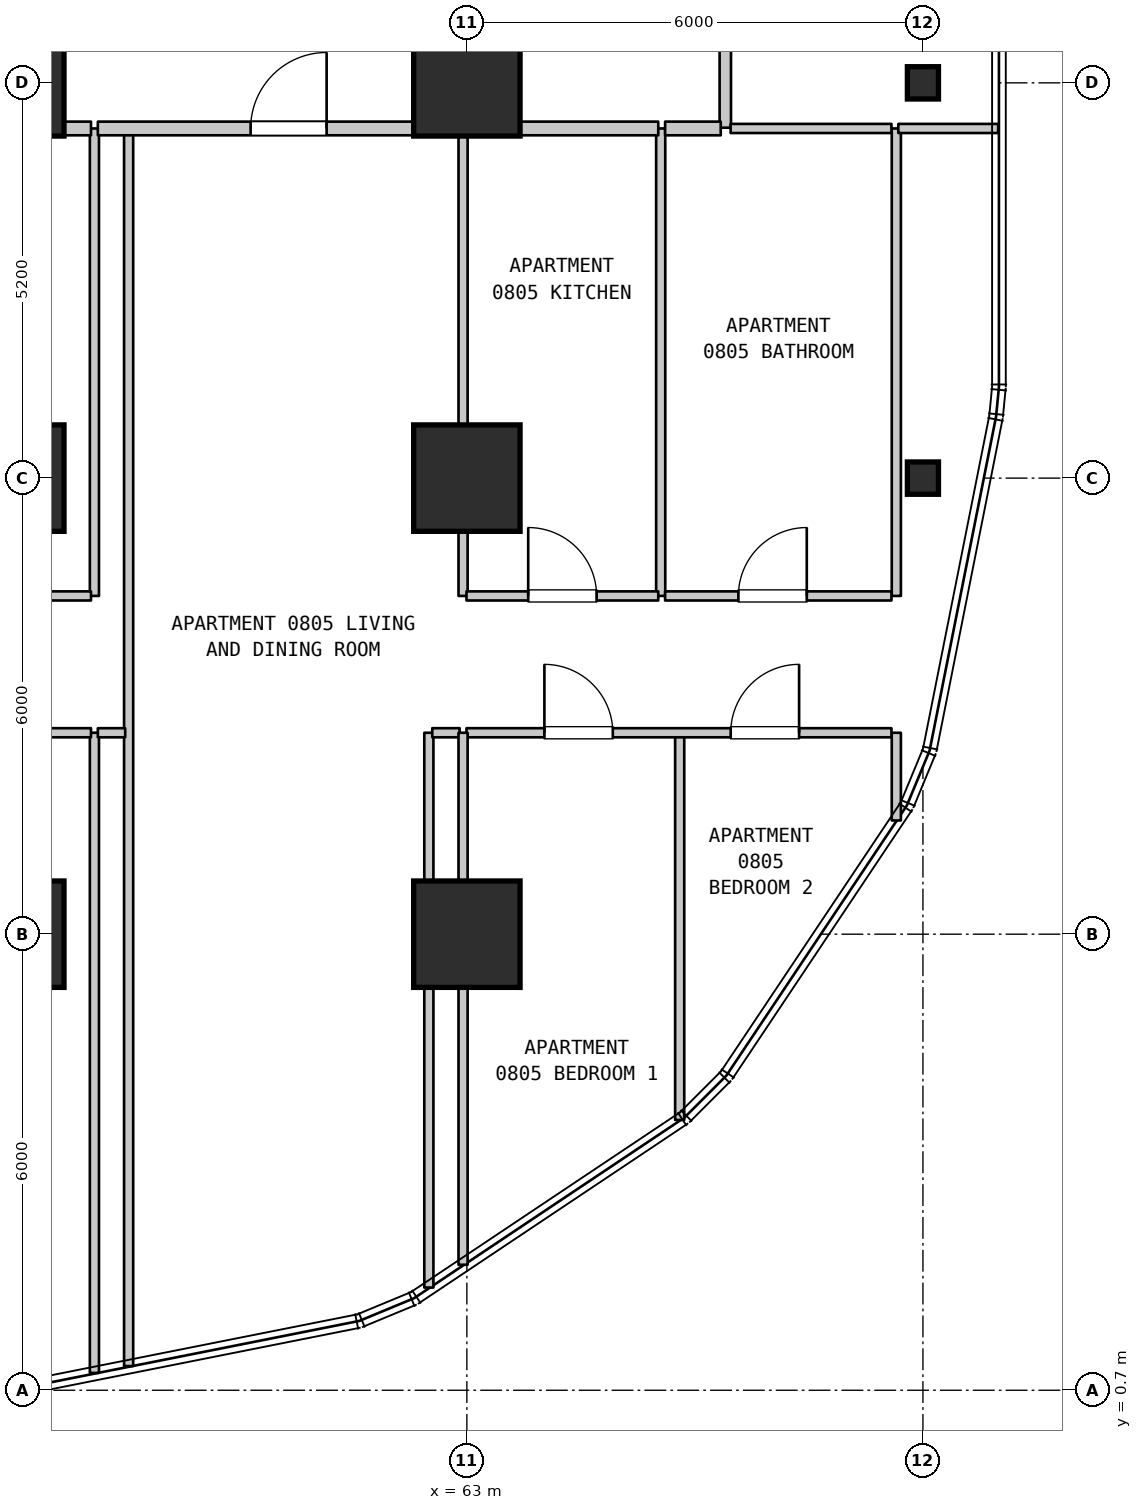
"""IFC4 building model, lengths in metres.
Left out: names, types, materials, properties, quantities, classifications, styles, units other than length and angle.
Written with IfcOpenShell. Run it as: python <this file> out.ifc"""

import sys

from ifc_helpers import new_model, si_unit, direction, frame, frame_2d, origin, origin_2d, place, context, subcontext, project, spatial, rectangle, i_section, extrude, element, fill, save


model = new_model("IFC4")
c1 = context("Model", 3, precision=1e-05, world=origin(), true_north=direction((0.0, 1.0)))
c2 = subcontext(c1, "Body", "Model", "MODEL_VIEW")
j1 = project(units=[si_unit("LENGTHUNIT", "METRE"), si_unit("PLANEANGLEUNIT", "RADIAN")], contexts=[c1])
p1 = place(None, origin())
s1 = spatial("IfcSite", under=j1, at=p1, CompositionType="ELEMENT")
p2 = place(p1, origin())
s2 = spatial("IfcBuilding", under=s1, at=p2, CompositionType="ELEMENT")
p3 = place(p2, frame((0.0, 0.0, 38.8)))
s3 = spatial("IfcBuildingStorey", under=s2, at=p3, CompositionType="ELEMENT", Elevation=38.8)
for number, where, z_axis, x_axis in (
    (1, (57.0, 6.7, 0.0), (0.0, 0.0, 1.0), (1.0, 0.0, 0.0)),
    (2, (57.0, 12.7, 0.0), (0.0, 0.0, 1.0), (1.0, 0.0, 0.0)),
    (3, (57.0, 17.9, 0.0), (0.0, 0.0, 1.0), (1.0, 0.0, 0.0)),
    (4, (63.0, 6.7, 0.0), (0.0, 0.0, 1.0), (1.0, 0.0, 0.0)),
    (5, (63.0, 12.7, 0.0), (0.0, 0.0, 1.0), (1.0, 0.0, 0.0)),
    (6, (63.0, 17.9, 0.0), (0.0, 0.0, 1.0), (1.0, 0.0, 0.0)),
):
    element("IfcColumn", number, at=place(p3, frame(where, z_axis=z_axis, x_axis=x_axis)), inside=s3, PredefinedType="COLUMN", context=c2, shape_type="SweptSolid", body=[
        extrude(rectangle(XDim=1.4, YDim=1.4, at=origin_2d()), origin(), (0.0, 0.0, 1.0), 3.7),
    ])
for number, where, z_axis, x_axis in (
    (7, (69.0, 12.7, 0.0), (0.0, 0.0, 1.0), (1.0, 0.0, 0.0)),
    (8, (69.0, 17.9, 0.0), (0.0, 0.0, 1.0), (1.0, 0.0, 0.0)),
):
    element("IfcColumn", number, at=place(p3, frame(where, z_axis=z_axis, x_axis=x_axis)), inside=s3, PredefinedType="COLUMN", context=c2, shape_type="SweptSolid", body=[
        extrude(i_section(OverallWidth=0.409, OverallDepth=0.425, WebThickness=0.032, FlangeThickness=0.052, FilletRadius=0.015, at=origin_2d()), origin(), (0.0, 0.0, 1.0), 3.7),
    ])
p4 = place(p3, frame((58.1, 0.928, 0.0), z_axis=(0.0, 0.0, 1.0), x_axis=(0.0, 1.0, 0.0)))
e9 = element("IfcWall", 9, at=p4, inside=s3, PredefinedType="PARTITIONING", context=c2, shape_type="SweptSolid", body=[
    extrude(rectangle(XDim=8.422, YDim=0.12, at=frame_2d((4.211, 0.0))), origin(), (0.0, 0.0, 1.0), 3.385),
])
p5 = place(p3, frame((58.1, 11.15, 0.0), z_axis=(0.0, 0.0, 1.0), x_axis=(0.0, 1.0, 0.0)))
e10 = element("IfcWall", 10, at=p5, inside=s3, PredefinedType="PARTITIONING", context=c2, shape_type="SweptSolid", body=[
    extrude(rectangle(XDim=6.15, YDim=0.12, at=frame_2d((3.075, 0.0))), origin(), (0.0, 0.0, 1.0), 3.385),
])
p6 = place(p3, frame((58.55, 1.018, 0.0), z_axis=(0.0, 0.0, 1.0), x_axis=(0.0, 1.0, 0.0)))
e11 = element("IfcWall", 11, at=p6, inside=s3, PredefinedType="PARTITIONING", context=c2, shape_type="SweptSolid", body=[
    extrude(rectangle(XDim=16.282, YDim=0.12, at=frame_2d((8.141, 0.0))), origin(), (0.0, 0.0, 1.0), 3.385),
])
p7 = place(p3, frame((62.5, 2.051, 0.0), z_axis=(0.0, 0.0, 1.0), x_axis=(0.0, 1.0, 0.0)))
e12 = element("IfcWall", 12, at=p7, inside=s3, PredefinedType="PARTITIONING", context=c2, shape_type="SweptSolid", body=[
    extrude(rectangle(XDim=7.299, YDim=0.12, at=frame_2d((3.649, 0.0))), origin(), (0.0, 0.0, 1.0), 3.385),
])
p8 = place(p3, frame((62.95, 2.351, 0.0), z_axis=(0.0, 0.0, 1.0), x_axis=(0.0, 1.0, 0.0)))
e13 = element("IfcWall", 13, at=p8, inside=s3, PredefinedType="PARTITIONING", context=c2, shape_type="SweptSolid", body=[
    extrude(rectangle(XDim=4.349, YDim=0.12, at=frame_2d((2.174, 0.0))), origin(), (0.0, 0.0, 1.0), 3.385),
])
p9 = place(p3, frame((62.95, 11.15, 0.0), z_axis=(0.0, 0.0, 1.0), x_axis=(0.0, 1.0, 0.0)))
e14 = element("IfcWall", 14, at=p9, inside=s3, PredefinedType="PARTITIONING", context=c2, shape_type="SweptSolid", body=[
    extrude(rectangle(XDim=6.15, YDim=0.12, at=frame_2d((3.075, 0.0))), origin(), (0.0, 0.0, 1.0), 2.885),
])
p10 = place(p3, frame((65.55, 11.15, 0.0), z_axis=(0.0, 0.0, 1.0), x_axis=(0.0, 1.0, 0.0)))
e15 = element("IfcWall", 15, at=p10, inside=s3, PredefinedType="PARTITIONING", context=c2, shape_type="SweptSolid", body=[
    extrude(rectangle(XDim=6.15, YDim=0.12, at=frame_2d((3.075, 0.0))), origin(), (0.0, 0.0, 1.0), 3.385),
])
p11 = place(p3, frame((65.8, 4.256, 0.0), z_axis=(0.0, 0.0, 1.0), x_axis=(0.0, 1.0, 0.0)))
e16 = element("IfcWall", 16, at=p11, inside=s3, PredefinedType="PARTITIONING", context=c2, shape_type="SweptSolid", body=[
    extrude(rectangle(XDim=5.094, YDim=0.12, at=frame_2d((2.547, 0.0))), origin(), (0.0, 0.0, 1.0), 3.385),
])
p12 = place(p3, frame((66.4, 17.31, 0.0), z_axis=(0.0, 0.0, 1.0), x_axis=(0.0, 1.0, 0.0)))
e17 = element("IfcWall", 17, at=p12, inside=s3, PredefinedType="STANDARD", context=c2, shape_type="SweptSolid", body=[
    extrude(rectangle(XDim=2.34, YDim=0.15, at=frame_2d((1.17, 0.0))), origin(), (0.0, 0.0, 1.0), 3.385),
])
p13 = place(p3, frame((68.65, 8.196, 0.0), z_axis=(0.0, 0.0, 1.0), x_axis=(0.0, 1.0, 0.0)))
e18 = element("IfcWall", 18, at=p13, inside=s3, PredefinedType="PARTITIONING", context=c2, shape_type="SweptSolid", body=[
    extrude(rectangle(XDim=1.154, YDim=0.12, at=frame_2d((0.577, 0.0))), origin(), (0.0, 0.0, 1.0), 3.385),
])
p14 = place(p3, frame((68.65, 11.15, 0.0), z_axis=(0.0, 0.0, 1.0), x_axis=(0.0, 1.0, 0.0)))
e19 = element("IfcWall", 19, at=p14, inside=s3, PredefinedType="PARTITIONING", context=c2, shape_type="SweptSolid", body=[
    extrude(rectangle(XDim=6.15, YDim=0.12, at=frame_2d((3.075, 0.0))), origin(), (0.0, 0.0, 1.0), 3.385),
])
p15 = place(p3, frame((51.635, 9.35, 0.0), z_axis=(0.0, 0.0, 1.0), x_axis=(1.0, 0.0, 0.0)))
e20 = element("IfcWall", 20, at=p15, inside=s3, PredefinedType="PARTITIONING", context=c2, shape_type="SweptSolid", body=[
    extrude(rectangle(XDim=6.42, YDim=0.12, at=frame_2d((3.21, 0.0))), origin(), (0.0, 0.0, 1.0), 3.385),
])
p16 = place(p15, frame((1.307, 0.0, 0.0)))
e21 = element("IfcOpeningElement", 21, at=p16, cuts=e20, PredefinedType="OPENING", context=c2, shape_type="SweptSolid", body=[
    extrude(rectangle(XDim=0.9, YDim=2.15, at=frame_2d((0.45, 1.075))), frame((0.0, 0.07, 0.0), z_axis=(0.0, -1.0, 0.0), x_axis=(1.0, 0.0, 0.0)), (0.0, 0.0, 1.0), 0.14),
])
p17 = place(p15, frame((4.212, 0.0, 0.0)))
e22 = element("IfcOpeningElement", 22, at=p17, cuts=e20, PredefinedType="OPENING", context=c2, shape_type="SweptSolid", body=[
    extrude(rectangle(XDim=0.9, YDim=2.15, at=frame_2d((0.45, 1.075))), frame((0.0, 0.07, 0.0), z_axis=(0.0, -1.0, 0.0), x_axis=(1.0, 0.0, 0.0)), (0.0, 0.0, 1.0), 0.14),
])
p18 = place(p3, frame((58.145, 9.35, 0.0), z_axis=(0.0, 0.0, 1.0), x_axis=(1.0, 0.0, 0.0)))
e23 = element("IfcWall", 23, at=p18, inside=s3, PredefinedType="PARTITIONING", context=c2, shape_type="SweptSolid", body=[
    extrude(rectangle(XDim=0.36, YDim=0.12, at=frame_2d((0.18, 0.0))), origin(), (0.0, 0.0, 1.0), 3.385),
])
p19 = place(p3, frame((62.545, 9.35, 0.0), z_axis=(0.0, 0.0, 1.0), x_axis=(1.0, 0.0, 0.0)))
e24 = element("IfcWall", 24, at=p19, inside=s3, PredefinedType="PARTITIONING", context=c2, shape_type="SweptSolid", body=[
    extrude(rectangle(XDim=0.36, YDim=0.12, at=frame_2d((0.18, 0.0))), origin(), (0.0, 0.0, 1.0), 3.385),
])
p20 = place(p3, frame((62.995, 9.35, 0.0), z_axis=(0.0, 0.0, 1.0), x_axis=(1.0, 0.0, 0.0)))
e25 = element("IfcWall", 25, at=p20, inside=s3, PredefinedType="PARTITIONING", context=c2, shape_type="SweptSolid", body=[
    extrude(rectangle(XDim=5.591, YDim=0.12, at=frame_2d((2.795, 0.0))), origin(), (0.0, 0.0, 1.0), 3.385),
])
p21 = place(p20, frame((1.025, 0.0, 0.0)))
e26 = element("IfcOpeningElement", 26, at=p21, cuts=e25, PredefinedType="OPENING", context=c2, shape_type="SweptSolid", body=[
    extrude(rectangle(XDim=0.9, YDim=2.15, at=frame_2d((0.45, 1.075))), frame((0.0, 0.07, 0.0), z_axis=(0.0, -1.0, 0.0), x_axis=(1.0, 0.0, 0.0)), (0.0, 0.0, 1.0), 0.14),
])
p22 = place(p20, frame((3.476, 0.0, 0.0)))
e27 = element("IfcOpeningElement", 27, at=p22, cuts=e25, PredefinedType="OPENING", context=c2, shape_type="SweptSolid", body=[
    extrude(rectangle(XDim=0.9, YDim=2.15, at=frame_2d((0.45, 1.075))), frame((0.0, 0.07, 0.0), z_axis=(0.0, -1.0, 0.0), x_axis=(1.0, 0.0, 0.0)), (0.0, 0.0, 1.0), 0.14),
])
p23 = place(p3, frame((54.63, 11.15, 0.0), z_axis=(0.0, 0.0, 1.0), x_axis=(1.0, 0.0, 0.0)))
e28 = element("IfcWall", 28, at=p23, inside=s3, PredefinedType="PARTITIONING", context=c2, shape_type="SweptSolid", body=[
    extrude(rectangle(XDim=3.425, YDim=0.12, at=frame_2d((1.712, 0.0))), origin(), (0.0, 0.0, 1.0), 3.385),
])
p24 = place(p23, frame((0.769, 0.0, 0.0)))
e29 = element("IfcOpeningElement", 29, at=p24, cuts=e28, PredefinedType="OPENING", context=c2, shape_type="SweptSolid", body=[
    extrude(rectangle(XDim=0.9, YDim=2.1, at=frame_2d((0.45, 1.05))), frame((0.0, 0.07, 0.0), z_axis=(0.0, -1.0, 0.0), x_axis=(1.0, 0.0, 0.0)), (0.0, 0.0, 1.0), 0.14),
])
p25 = place(p3, frame((62.995, 11.15, 0.0), z_axis=(0.0, 0.0, 1.0), x_axis=(1.0, 0.0, 0.0)))
e30 = element("IfcWall", 30, at=p25, inside=s3, PredefinedType="PARTITIONING", context=c2, shape_type="SweptSolid", body=[
    extrude(rectangle(XDim=2.523, YDim=0.12, at=frame_2d((1.261, 0.0))), origin(), (0.0, 0.0, 1.0), 3.385),
])
p26 = place(p25, frame((0.812, 0.0, 0.0)))
e31 = element("IfcOpeningElement", 31, at=p26, cuts=e30, PredefinedType="OPENING", context=c2, shape_type="SweptSolid", body=[
    extrude(rectangle(XDim=0.9, YDim=2.15, at=frame_2d((0.45, 1.075))), frame((0.0, 0.07, 0.0), z_axis=(0.0, -1.0, 0.0), x_axis=(1.0, 0.0, 0.0)), (0.0, 0.0, 1.0), 0.14),
])
p27 = place(p3, frame((65.608, 11.15, 0.0), z_axis=(0.0, 0.0, 1.0), x_axis=(1.0, 0.0, 0.0)))
e32 = element("IfcWall", 32, at=p27, inside=s3, PredefinedType="PARTITIONING", context=c2, shape_type="SweptSolid", body=[
    extrude(rectangle(XDim=2.978, YDim=0.12, at=frame_2d((1.489, 0.0))), origin(), (0.0, 0.0, 1.0), 3.385),
])
p28 = place(p27, frame((0.964, 0.0, 0.0)))
e33 = element("IfcOpeningElement", 33, at=p28, cuts=e32, PredefinedType="OPENING", context=c2, shape_type="SweptSolid", body=[
    extrude(rectangle(XDim=0.9, YDim=2.1, at=frame_2d((0.45, 1.05))), frame((0.0, 0.07, 0.0), z_axis=(0.0, -1.0, 0.0), x_axis=(1.0, 0.0, 0.0)), (0.0, 0.0, 1.0), 0.14),
])
p29 = place(p3, frame((54.63, 17.3, 0.0), z_axis=(0.0, 0.0, 1.0), x_axis=(1.0, 0.0, 0.0)))
e34 = element("IfcWall", 34, at=p29, inside=s3, PredefinedType="STANDARD", context=c2, shape_type="SweptSolid", body=[
    extrude(rectangle(XDim=3.425, YDim=0.18, at=frame_2d((1.712, 0.0))), origin(), (0.0, 0.0, 1.0), 3.385),
])
p30 = place(p3, frame((58.145, 17.3, 0.0), z_axis=(0.0, 0.0, 1.0), x_axis=(1.0, 0.0, 0.0)))
e35 = element("IfcWall", 35, at=p30, inside=s3, PredefinedType="STANDARD", context=c2, shape_type="SweptSolid", body=[
    extrude(rectangle(XDim=4.76, YDim=0.18, at=frame_2d((2.38, 0.0))), origin(), (0.0, 0.0, 1.0), 3.385),
])
p31 = place(p30, frame((2.01, 0.0, 0.0)))
e36 = element("IfcOpeningElement", 36, at=p31, cuts=e35, PredefinedType="OPENING", context=c2, shape_type="SweptSolid", body=[
    extrude(rectangle(XDim=1.0, YDim=2.15, at=frame_2d((0.5, 1.075))), frame((0.0, 0.1, 0.0), z_axis=(0.0, -1.0, 0.0), x_axis=(1.0, 0.0, 0.0)), (0.0, 0.0, 1.0), 0.2),
])
p32 = place(p3, frame((62.995, 17.3, 0.0), z_axis=(0.0, 0.0, 1.0), x_axis=(1.0, 0.0, 0.0)))
e37 = element("IfcWall", 37, at=p32, inside=s3, PredefinedType="STANDARD", context=c2, shape_type="SweptSolid", body=[
    extrude(rectangle(XDim=2.523, YDim=0.18, at=frame_2d((1.261, 0.0))), origin(), (0.0, 0.0, 1.0), 3.385),
])
p33 = place(p3, frame((65.608, 17.3, 0.0), z_axis=(0.0, 0.0, 1.0), x_axis=(1.0, 0.0, 0.0)))
e38 = element("IfcWall", 38, at=p33, inside=s3, PredefinedType="STANDARD", context=c2, shape_type="SweptSolid", body=[
    extrude(rectangle(XDim=0.732, YDim=0.18, at=frame_2d((0.366, 0.0))), origin(), (0.0, 0.0, 1.0), 3.385),
])
p34 = place(p3, frame((66.47, 17.3, 0.0), z_axis=(0.0, 0.0, 1.0), x_axis=(1.0, 0.0, 0.0)))
e39 = element("IfcWall", 39, at=p34, inside=s3, PredefinedType="PARTITIONING", context=c2, shape_type="SweptSolid", body=[
    extrude(rectangle(XDim=2.116, YDim=0.12, at=frame_2d((1.058, 0.0))), origin(), (0.0, 0.0, 1.0), 3.385),
])
p35 = place(p3, frame((68.676, 17.3, 0.0), z_axis=(0.0, 0.0, 1.0), x_axis=(1.0, 0.0, 0.0)))
e40 = element("IfcWall", 40, at=p35, inside=s3, PredefinedType="PARTITIONING", context=c2, shape_type="SweptSolid", body=[
    extrude(rectangle(XDim=1.314, YDim=0.12, at=frame_2d((0.657, 0.0))), origin(), (0.0, 0.0, 1.0), 3.385),
])
p36 = place(p3, frame((62.95, 6.7, 0.0), z_axis=(0.0, 0.0, 1.0), x_axis=(0.0, 1.0, 0.0)))
e41 = element("IfcWall", 41, at=p36, inside=s3, PredefinedType="PARTITIONING", context=c2, shape_type="SweptSolid", body=[
    extrude(rectangle(XDim=2.65, YDim=0.12, at=frame_2d((1.325, 0.0))), origin(), (0.0, 0.0, 1.0), 2.885),
])
p37 = place(p21, origin())
e42 = element("IfcDoor", 42, at=p37, inside=s3, OperationType="SINGLE_SWING_LEFT", PredefinedType="DOOR", context=c2, shape_type="SweptSolid", body=[
    extrude(rectangle(XDim=0.9, YDim=2.15, at=frame_2d((0.45, 1.075))), frame((0.0, 0.025, 0.0), z_axis=(0.0, -1.0, 0.0), x_axis=(1.0, 0.0, 0.0)), (0.0, 0.0, 1.0), 0.05),
])
fill(e26, e42)
p38 = place(p22, origin())
e43 = element("IfcDoor", 43, at=p38, inside=s3, OperationType="SINGLE_SWING_RIGHT", PredefinedType="DOOR", context=c2, shape_type="SweptSolid", body=[
    extrude(rectangle(XDim=0.9, YDim=2.15, at=frame_2d((0.45, 1.075))), frame((0.0, 0.025, 0.0), z_axis=(0.0, -1.0, 0.0), x_axis=(1.0, 0.0, 0.0)), (0.0, 0.0, 1.0), 0.05),
])
fill(e27, e43)
p39 = place(p26, origin())
e44 = element("IfcDoor", 44, at=p39, inside=s3, OperationType="SINGLE_SWING_LEFT", PredefinedType="DOOR", context=c2, shape_type="SweptSolid", body=[
    extrude(rectangle(XDim=0.9, YDim=2.15, at=frame_2d((0.45, 1.075))), frame((0.0, 0.025, 0.0), z_axis=(0.0, -1.0, 0.0), x_axis=(1.0, 0.0, 0.0)), (0.0, 0.0, 1.0), 0.05),
])
fill(e31, e44)
p40 = place(p28, origin())
e45 = element("IfcDoor", 45, at=p40, inside=s3, OperationType="SINGLE_SWING_RIGHT", PredefinedType="DOOR", context=c2, shape_type="SweptSolid", body=[
    extrude(rectangle(XDim=0.9, YDim=2.1, at=frame_2d((0.45, 1.05))), frame((0.0, 0.025, 0.0), z_axis=(0.0, -1.0, 0.0), x_axis=(1.0, 0.0, 0.0)), (0.0, 0.0, 1.0), 0.05),
])
fill(e33, e45)
p41 = place(p31, origin())
e46 = element("IfcDoor", 46, at=p41, inside=s3, OperationType="SINGLE_SWING_RIGHT", PredefinedType="DOOR", context=c2, shape_type="SweptSolid", body=[
    extrude(rectangle(XDim=1.0, YDim=2.15, at=frame_2d((0.5, 1.075))), frame((0.0, 0.025, 0.0), z_axis=(0.0, -1.0, 0.0), x_axis=(1.0, 0.0, 0.0)), (0.0, 0.0, 1.0), 0.05),
])
fill(e36, e46)
save(model, sys.argv[1])
